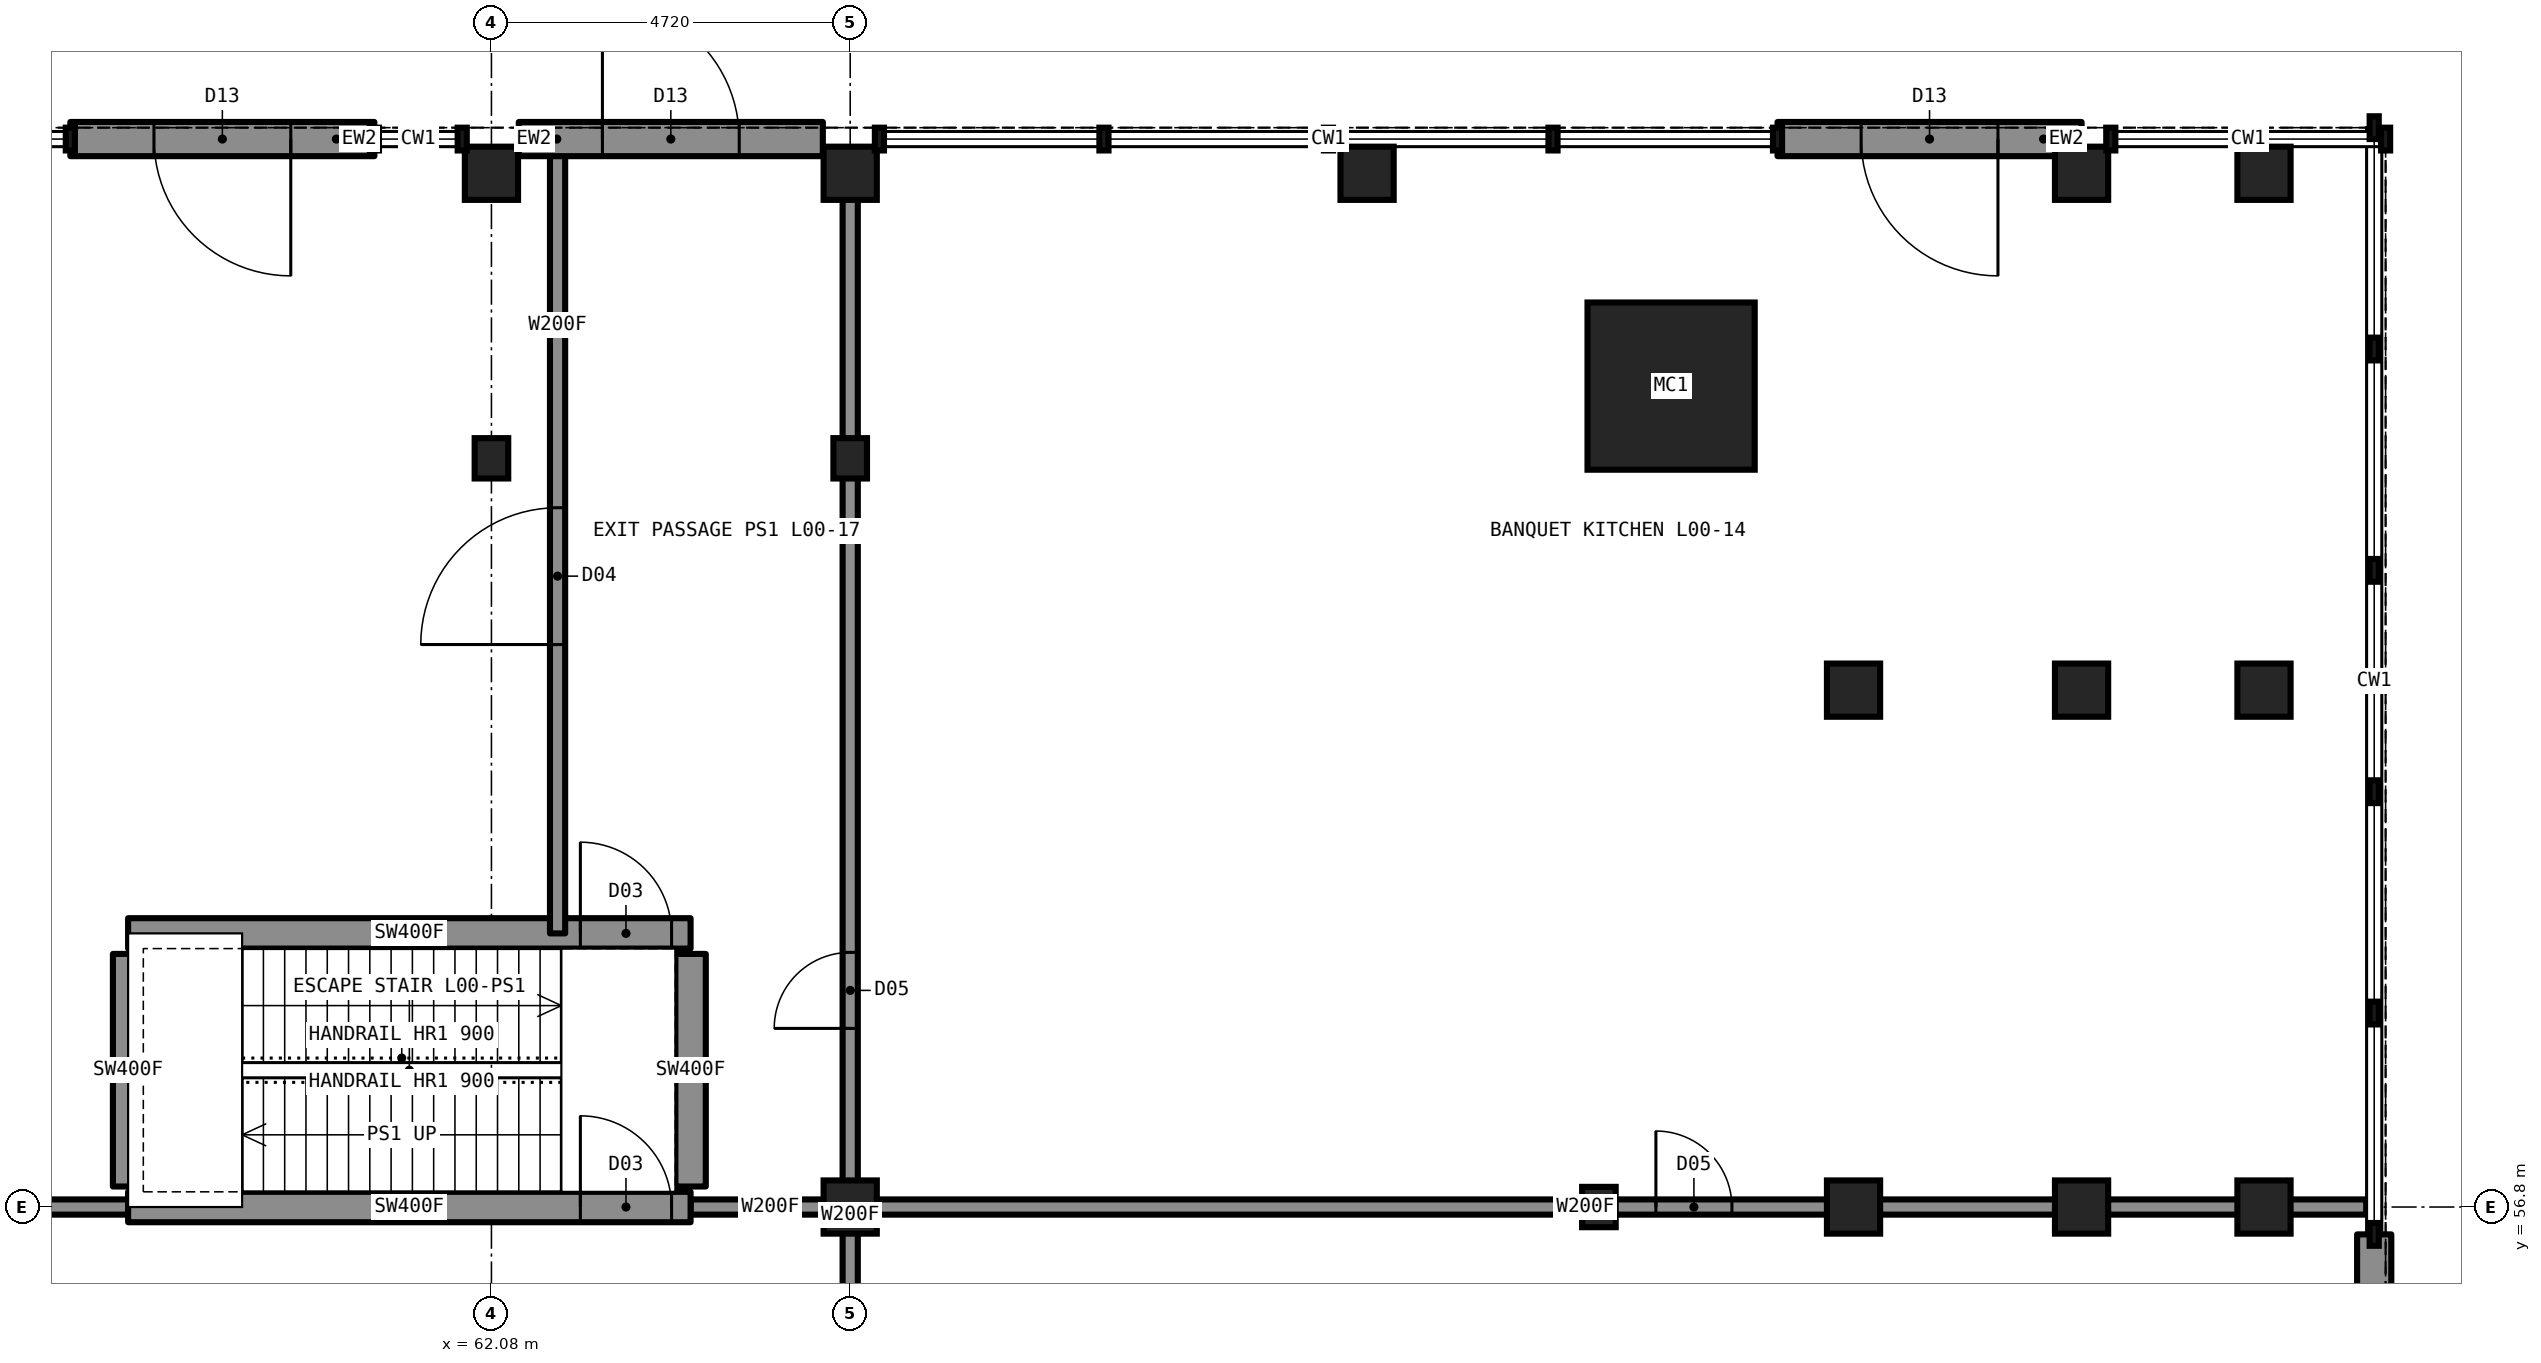
"""IFC4 building model, lengths in metres.
Left out: names, types, materials, properties, quantities, classifications, styles, units other than length and angle.
Written with IfcOpenShell. Run it as: python <this file> out.ifc"""

import sys

from ifc_helpers import new_model, si_unit, direction, frame, frame_2d, origin, origin_2d, place, context, subcontext, project, spatial, rectangle, hollow_rectangle, i_section, extrude, element, fill, save


model = new_model("IFC4")
c1 = context("Model", 3, precision=1e-05, world=origin(), true_north=direction((0.0, 1.0)))
c2 = subcontext(c1, "Body", "Model", "MODEL_VIEW")
j1 = project(units=[si_unit("LENGTHUNIT", "METRE"), si_unit("PLANEANGLEUNIT", "RADIAN")], contexts=[c1])
p1 = place(None, origin())
s1 = spatial("IfcSite", under=j1, at=p1, CompositionType="ELEMENT")
p2 = place(p1, origin())
s2 = spatial("IfcBuilding", under=s1, at=p2, CompositionType="ELEMENT")
p3 = place(p2, origin())
s3 = spatial("IfcBuildingStorey", under=s2, at=p3, CompositionType="ELEMENT", Elevation=0.0)
for number, where, z_axis, x_axis in (
    (1, (62.08, 66.65, 0.0), (0.0, 0.0, 1.0), (1.0, 0.0, 0.0)),
    (2, (66.8, 66.65, 0.0), (0.0, 0.0, 1.0), (1.0, 0.0, 0.0)),
    (3, (76.65, 56.8, 0.0), (0.0, 0.0, 1.0), (1.0, 0.0, 0.0)),
):
    element("IfcColumn", number, at=place(p3, frame(where, z_axis=z_axis, x_axis=x_axis)), inside=s3, PredefinedType="COLUMN", context=c2, shape_type="SweptSolid", body=[
        extrude(i_section(OverallWidth=0.442, OverallDepth=0.531, WebThickness=0.066, FlangeThickness=0.106, at=origin_2d()), origin(), (0.0, 0.0, 1.0), 5.6),
    ])
p4 = place(p3, frame((66.8, 56.8, 0.0), z_axis=(0.0, 0.0, 1.0), x_axis=(1.0, 0.0, 0.0)))
e4 = element("IfcColumn", 4, at=p4, inside=s3, PredefinedType="COLUMN", context=c2, shape_type="SweptSolid", body=[
    extrude(hollow_rectangle(XDim=0.7, YDim=0.7, WallThickness=0.06, at=origin_2d()), origin(), (0.0, 0.0, 1.0), 5.6),
])
p5 = place(p3, frame((77.6, 67.6, 0.0), z_axis=(0.0, 0.0, 1.0), x_axis=(1.0, 0.0, 0.0)))
e5 = element("IfcColumn", 5, at=p5, inside=s3, PredefinedType="COLUMN", context=c2, shape_type="SweptSolid", body=[
    extrude(hollow_rectangle(XDim=2.2, YDim=2.2, WallThickness=0.15, at=origin_2d()), origin(), (0.0, 0.0, 1.0), 5.6),
])
for number, where, z_axis, x_axis in (
    (6, (62.08, 70.4, 0.0), (0.0, 0.0, 1.0), (1.0, 0.0, 0.0)),
    (7, (66.8, 70.4, 0.0), (0.0, 0.0, 1.0), (1.0, 0.0, 0.0)),
    (8, (73.6, 70.4, 0.0), (0.0, 0.0, 1.0), (1.0, 0.0, 0.0)),
    (9, (80.0, 56.8, 0.0), (0.0, 0.0, 1.0), (1.0, 0.0, 0.0)),
    (10, (80.0, 63.6, 0.0), (0.0, 0.0, 1.0), (1.0, 0.0, 0.0)),
    (11, (83.0, 56.8, 0.0), (0.0, 0.0, 1.0), (1.0, 0.0, 0.0)),
    (12, (83.0, 63.6, 0.0), (0.0, 0.0, 1.0), (1.0, 0.0, 0.0)),
    (13, (83.0, 70.4, 0.0), (0.0, 0.0, 1.0), (1.0, 0.0, 0.0)),
    (14, (85.4, 56.8, 0.0), (0.0, 0.0, 1.0), (1.0, 0.0, 0.0)),
    (15, (85.4, 63.6, 0.0), (0.0, 0.0, 1.0), (1.0, 0.0, 0.0)),
    (16, (85.4, 70.4, 0.0), (0.0, 0.0, 1.0), (1.0, 0.0, 0.0)),
):
    element("IfcColumn", number, at=place(p3, frame(where, z_axis=z_axis, x_axis=x_axis)), inside=s3, PredefinedType="COLUMN", context=c2, shape_type="SweptSolid", body=[
        extrude(rectangle(XDim=0.7, YDim=0.7, at=origin_2d()), origin(), (0.0, 0.0, 1.0), 5.6),
    ])
p6 = place(p3, frame((43.2, 56.8, 0.0), z_axis=(0.0, 0.0, 1.0), x_axis=(1.0, 0.0, 0.0)))
e17 = element("IfcWall", 17, at=p6, inside=s3, PredefinedType="PARTITIONING", context=c2, shape_type="SweptSolid", body=[
    extrude(rectangle(XDim=14.1, YDim=0.2, at=frame_2d((7.05, 0.0))), origin(), (0.0, 0.0, 1.0), 5.25),
])
p7 = place(p6, frame((4.9, 0.0, 0.0)))
e18 = element("IfcOpeningElement", 18, at=p7, cuts=e17, PredefinedType="OPENING", context=c2, shape_type="SweptSolid", body=[
    extrude(rectangle(XDim=1.8, YDim=2.2, at=frame_2d((0.9, 1.1))), frame((0.0, 0.11, 0.0), z_axis=(0.0, -1.0, 0.0), x_axis=(1.0, 0.0, 0.0)), (0.0, 0.0, 1.0), 0.22),
])
p8 = place(p3, frame((64.7, 56.8, 0.0), z_axis=(0.0, 0.0, 1.0), x_axis=(1.0, 0.0, 0.0)))
e19 = element("IfcWall", 19, at=p8, inside=s3, PredefinedType="PARTITIONING", context=c2, shape_type="SweptSolid", body=[
    extrude(rectangle(XDim=2.1, YDim=0.2, at=frame_2d((1.05, 0.0))), origin(), (0.0, 0.0, 1.0), 5.25),
])
p9 = place(p3, frame((66.8, 56.8, 0.0), z_axis=(0.0, 0.0, 1.0), x_axis=(1.0, 0.0, 0.0)))
e20 = element("IfcWall", 20, at=p9, inside=s3, PredefinedType="PARTITIONING", context=c2, shape_type="SweptSolid", body=[
    extrude(rectangle(XDim=19.945, YDim=0.2, at=frame_2d((9.973, 0.0))), origin(), (0.0, 0.0, 1.0), 5.25),
])
p10 = place(p9, frame((10.6, 0.0, 0.0)))
e21 = element("IfcOpeningElement", 21, at=p10, cuts=e20, PredefinedType="OPENING", context=c2, shape_type="SweptSolid", body=[
    extrude(rectangle(XDim=1.0, YDim=2.1, at=frame_2d((0.5, 1.05))), frame((0.0, 0.11, 0.0), z_axis=(0.0, -1.0, 0.0), x_axis=(1.0, 0.0, 0.0)), (0.0, 0.0, 1.0), 0.22),
])
p11 = place(p3, frame((57.3, 56.8, 0.0), z_axis=(0.0, 0.0, 1.0), x_axis=(1.0, 0.0, 0.0)))
e22 = element("IfcWall", 22, at=p11, inside=s3, PredefinedType="SHEAR", context=c2, shape_type="SweptSolid", body=[
    extrude(rectangle(XDim=7.4, YDim=0.4, at=frame_2d((3.7, 0.0))), origin(), (0.0, 0.0, 1.0), 5.6),
])
p12 = place(p11, frame((5.95, 0.0, 0.0)))
e23 = element("IfcOpeningElement", 23, at=p12, cuts=e22, PredefinedType="OPENING", context=c2, shape_type="SweptSolid", body=[
    extrude(rectangle(XDim=1.2, YDim=2.2, at=frame_2d((0.6, 1.1))), frame((0.0, 0.21, 0.0), z_axis=(0.0, -1.0, 0.0), x_axis=(1.0, 0.0, 0.0)), (0.0, 0.0, 1.0), 0.42),
])
p13 = place(p3, frame((57.3, 60.4, 0.0), z_axis=(0.0, 0.0, 1.0), x_axis=(1.0, 0.0, 0.0)))
e24 = element("IfcWall", 24, at=p13, inside=s3, PredefinedType="SHEAR", context=c2, shape_type="SweptSolid", body=[
    extrude(rectangle(XDim=7.4, YDim=0.4, at=frame_2d((3.7, 0.0))), origin(), (0.0, 0.0, 1.0), 5.6),
])
p14 = place(p13, frame((5.95, 0.0, 0.0)))
e25 = element("IfcOpeningElement", 25, at=p14, cuts=e24, PredefinedType="OPENING", context=c2, shape_type="SweptSolid", body=[
    extrude(rectangle(XDim=1.2, YDim=2.2, at=frame_2d((0.6, 1.1))), frame((0.0, 0.21, 0.0), z_axis=(0.0, -1.0, 0.0), x_axis=(1.0, 0.0, 0.0)), (0.0, 0.0, 1.0), 0.42),
])
p15 = place(p3, frame((66.8, 42.7, 0.0), z_axis=(0.0, 0.0, 1.0), x_axis=(0.0, 1.0, 0.0)))
e26 = element("IfcWall", 26, at=p15, inside=s3, PredefinedType="PARTITIONING", context=c2, shape_type="SweptSolid", body=[
    extrude(rectangle(XDim=28.0, YDim=0.2, at=frame_2d((14.0, 0.0))), origin(), (0.0, 0.0, 1.0), 5.25),
])
p16 = place(p15, frame((1.7, 0.0, 0.0)))
e27 = element("IfcOpeningElement", 27, at=p16, cuts=e26, PredefinedType="OPENING", context=c2, shape_type="SweptSolid", body=[
    extrude(rectangle(XDim=1.2, YDim=2.2, at=frame_2d((0.6, 1.1))), frame((0.0, 0.11, 0.0), z_axis=(0.0, -1.0, 0.0), x_axis=(1.0, 0.0, 0.0)), (0.0, 0.0, 1.0), 0.22),
])
p17 = place(p15, frame((8.7, 0.0, 0.0)))
e28 = element("IfcOpeningElement", 28, at=p17, cuts=e26, PredefinedType="OPENING", context=c2, shape_type="SweptSolid", body=[
    extrude(rectangle(XDim=1.2, YDim=2.2, at=frame_2d((0.6, 1.1))), frame((0.0, 0.11, 0.0), z_axis=(0.0, -1.0, 0.0), x_axis=(1.0, 0.0, 0.0)), (0.0, 0.0, 1.0), 0.22),
])
p18 = place(p15, frame((16.45, 0.0, 0.0)))
e29 = element("IfcOpeningElement", 29, at=p18, cuts=e26, PredefinedType="OPENING", context=c2, shape_type="SweptSolid", body=[
    extrude(rectangle(XDim=1.0, YDim=2.1, at=frame_2d((0.5, 1.05))), frame((0.0, 0.11, 0.0), z_axis=(0.0, -1.0, 0.0), x_axis=(1.0, 0.0, 0.0)), (0.0, 0.0, 1.0), 0.22),
])
p19 = place(p3, frame((57.3, 57.07, 0.0), z_axis=(0.0, 0.0, 1.0), x_axis=(0.0, 1.0, 0.0)))
e30 = element("IfcWall", 30, at=p19, inside=s3, PredefinedType="SHEAR", context=c2, shape_type="SweptSolid", body=[
    extrude(rectangle(XDim=3.06, YDim=0.4, at=frame_2d((1.53, 0.0))), origin(), (0.0, 0.0, 1.0), 5.6),
])
p20 = place(p3, frame((62.95, 60.4, 0.0), z_axis=(0.0, 0.0, 1.0), x_axis=(0.0, 1.0, 0.0)))
e31 = element("IfcWall", 31, at=p20, inside=s3, PredefinedType="PARTITIONING", context=c2, shape_type="SweptSolid", body=[
    extrude(rectangle(XDim=10.3, YDim=0.2, at=frame_2d((5.15, 0.0))), origin(), (0.0, 0.0, 1.0), 5.25),
])
p21 = place(p20, frame((3.8, 0.0, 0.0)))
e32 = element("IfcOpeningElement", 32, at=p21, cuts=e31, PredefinedType="OPENING", context=c2, shape_type="SweptSolid", body=[
    extrude(rectangle(XDim=1.8, YDim=2.2, at=frame_2d((0.9, 1.1))), frame((0.0, 0.11, 0.0), z_axis=(0.0, -1.0, 0.0), x_axis=(1.0, 0.0, 0.0)), (0.0, 0.0, 1.0), 0.22),
])
p22 = place(p3, frame((64.7, 57.07, 0.0), z_axis=(0.0, 0.0, 1.0), x_axis=(0.0, 1.0, 0.0)))
e33 = element("IfcWall", 33, at=p22, inside=s3, PredefinedType="SHEAR", context=c2, shape_type="SweptSolid", body=[
    extrude(rectangle(XDim=3.06, YDim=0.4, at=frame_2d((1.53, 0.0))), origin(), (0.0, 0.0, 1.0), 5.6),
])
p23 = place(p3, frame((86.85, 52.44, 0.0), z_axis=(0.0, 0.0, 1.0), x_axis=(0.0, 1.0, 0.0)))
e34 = element("IfcWall", 34, at=p23, inside=s3, PredefinedType="SOLIDWALL", context=c2, shape_type="SweptSolid", body=[
    extrude(rectangle(XDim=4.0, YDim=0.45, at=frame_2d((2.0, 0.0))), origin(), (0.0, 0.0, 1.0), 5.25),
])
p24 = place(p23, frame((1.1, 0.0, 0.0)))
e35 = element("IfcOpeningElement", 35, at=p24, cuts=e34, PredefinedType="OPENING", context=c2, shape_type="SweptSolid", body=[
    extrude(rectangle(XDim=1.8, YDim=2.4, at=frame_2d((0.9, 1.2))), frame((0.0, 0.235, 0.0), z_axis=(0.0, -1.0, 0.0), x_axis=(1.0, 0.0, 0.0)), (0.0, 0.0, 1.0), 0.47),
])
p25 = place(p3, frame((83.0, 70.85, 0.0), z_axis=(0.0, 0.0, 1.0), x_axis=(-1.0, 0.0, 0.0)))
e36 = element("IfcWall", 36, at=p25, inside=s3, PredefinedType="SOLIDWALL", context=c2, shape_type="SweptSolid", body=[
    extrude(rectangle(XDim=4.0, YDim=0.45, at=frame_2d((2.0, 0.0))), origin(), (0.0, 0.0, 1.0), 5.25),
])
p26 = place(p25, frame((1.1, 0.0, 0.0)))
e37 = element("IfcOpeningElement", 37, at=p26, cuts=e36, PredefinedType="OPENING", context=c2, shape_type="SweptSolid", body=[
    extrude(rectangle(XDim=1.8, YDim=2.4, at=frame_2d((0.9, 1.2))), frame((0.0, 0.235, 0.0), z_axis=(0.0, -1.0, 0.0), x_axis=(1.0, 0.0, 0.0)), (0.0, 0.0, 1.0), 0.47),
])
p27 = place(p3, frame((62.44, 70.85, 0.0), z_axis=(0.0, 0.0, 1.0), x_axis=(1.0, 0.0, 0.0)))
e38 = element("IfcWall", 38, at=p27, inside=s3, PredefinedType="SOLIDWALL", context=c2, shape_type="SweptSolid", body=[
    extrude(rectangle(XDim=4.0, YDim=0.45, at=frame_2d((2.0, 0.0))), origin(), (0.0, 0.0, 1.0), 5.25),
])
p28 = place(p27, frame((1.1, 0.0, 0.0)))
e39 = element("IfcOpeningElement", 39, at=p28, cuts=e38, PredefinedType="OPENING", context=c2, shape_type="SweptSolid", body=[
    extrude(rectangle(XDim=1.8, YDim=2.4, at=frame_2d((0.9, 1.2))), frame((0.0, 0.235, 0.0), z_axis=(0.0, -1.0, 0.0), x_axis=(1.0, 0.0, 0.0)), (0.0, 0.0, 1.0), 0.47),
])
p29 = place(p3, frame((60.54, 70.85, 0.0), z_axis=(0.0, 0.0, 1.0), x_axis=(-1.0, 0.0, 0.0)))
e40 = element("IfcWall", 40, at=p29, inside=s3, PredefinedType="SOLIDWALL", context=c2, shape_type="SweptSolid", body=[
    extrude(rectangle(XDim=4.0, YDim=0.45, at=frame_2d((2.0, 0.0))), origin(), (0.0, 0.0, 1.0), 5.25),
])
p30 = place(p29, frame((1.1, 0.0, 0.0)))
e41 = element("IfcOpeningElement", 41, at=p30, cuts=e40, PredefinedType="OPENING", context=c2, shape_type="SweptSolid", body=[
    extrude(rectangle(XDim=1.8, YDim=2.4, at=frame_2d((0.9, 1.2))), frame((0.0, 0.235, 0.0), z_axis=(0.0, -1.0, 0.0), x_axis=(1.0, 0.0, 0.0)), (0.0, 0.0, 1.0), 0.47),
])
p31 = place(p12, origin())
e42 = element("IfcDoor", 42, at=p31, inside=s3, OperationType="SINGLE_SWING_LEFT", PredefinedType="DOOR", context=c2, shape_type="SweptSolid", body=[
    extrude(rectangle(XDim=1.2, YDim=2.2, at=frame_2d((0.6, 1.1))), frame((0.0, 0.025, 0.0), z_axis=(0.0, -1.0, 0.0), x_axis=(1.0, 0.0, 0.0)), (0.0, 0.0, 1.0), 0.05),
])
fill(e23, e42)
p32 = place(p14, origin())
e43 = element("IfcDoor", 43, at=p32, inside=s3, OperationType="SINGLE_SWING_LEFT", PredefinedType="DOOR", context=c2, shape_type="SweptSolid", body=[
    extrude(rectangle(XDim=1.2, YDim=2.2, at=frame_2d((0.6, 1.1))), frame((0.0, 0.025, 0.0), z_axis=(0.0, -1.0, 0.0), x_axis=(1.0, 0.0, 0.0)), (0.0, 0.0, 1.0), 0.05),
])
fill(e25, e43)
p33 = place(p18, origin())
e44 = element("IfcDoor", 44, at=p33, inside=s3, OperationType="SINGLE_SWING_LEFT", PredefinedType="DOOR", context=c2, shape_type="SweptSolid", body=[
    extrude(rectangle(XDim=1.0, YDim=2.1, at=frame_2d((0.5, 1.05))), frame((0.0, 0.025, 0.0), z_axis=(0.0, -1.0, 0.0), x_axis=(1.0, 0.0, 0.0)), (0.0, 0.0, 1.0), 0.05),
])
fill(e29, e44)
p34 = place(p10, origin())
e45 = element("IfcDoor", 45, at=p34, inside=s3, OperationType="SINGLE_SWING_LEFT", PredefinedType="DOOR", context=c2, shape_type="SweptSolid", body=[
    extrude(rectangle(XDim=1.0, YDim=2.1, at=frame_2d((0.5, 1.05))), frame((0.0, 0.025, 0.0), z_axis=(0.0, -1.0, 0.0), x_axis=(1.0, 0.0, 0.0)), (0.0, 0.0, 1.0), 0.05),
])
fill(e21, e45)
p35 = place(p21, origin())
e46 = element("IfcDoor", 46, at=p35, inside=s3, OperationType="DOUBLE_DOOR_SINGLE_SWING", PredefinedType="DOOR", context=c2, shape_type="SweptSolid", body=[
    extrude(rectangle(XDim=1.8, YDim=2.2, at=frame_2d((0.9, 1.1))), frame((0.0, 0.025, 0.0), z_axis=(0.0, -1.0, 0.0), x_axis=(1.0, 0.0, 0.0)), (0.0, 0.0, 1.0), 0.05),
])
fill(e32, e46)
p36 = place(p26, origin())
e47 = element("IfcDoor", 47, at=p36, inside=s3, OperationType="DOUBLE_DOOR_SINGLE_SWING", PredefinedType="DOOR", context=c2, shape_type="SweptSolid", body=[
    extrude(rectangle(XDim=1.8, YDim=2.4, at=frame_2d((0.9, 1.2))), frame((0.0, 0.025, 0.0), z_axis=(0.0, -1.0, 0.0), x_axis=(1.0, 0.0, 0.0)), (0.0, 0.0, 1.0), 0.05),
])
fill(e37, e47)
p37 = place(p28, origin())
e48 = element("IfcDoor", 48, at=p37, inside=s3, OperationType="DOUBLE_DOOR_SINGLE_SWING", PredefinedType="DOOR", context=c2, shape_type="SweptSolid", body=[
    extrude(rectangle(XDim=1.8, YDim=2.4, at=frame_2d((0.9, 1.2))), frame((0.0, 0.025, 0.0), z_axis=(0.0, -1.0, 0.0), x_axis=(1.0, 0.0, 0.0)), (0.0, 0.0, 1.0), 0.05),
])
fill(e39, e48)
p38 = place(p30, origin())
e49 = element("IfcDoor", 49, at=p38, inside=s3, OperationType="DOUBLE_DOOR_SINGLE_SWING", PredefinedType="DOOR", context=c2, shape_type="SweptSolid", body=[
    extrude(rectangle(XDim=1.8, YDim=2.4, at=frame_2d((0.9, 1.2))), frame((0.0, 0.025, 0.0), z_axis=(0.0, -1.0, 0.0), x_axis=(1.0, 0.0, 0.0)), (0.0, 0.0, 1.0), 0.05),
])
fill(e41, e49)
save(model, sys.argv[1])
